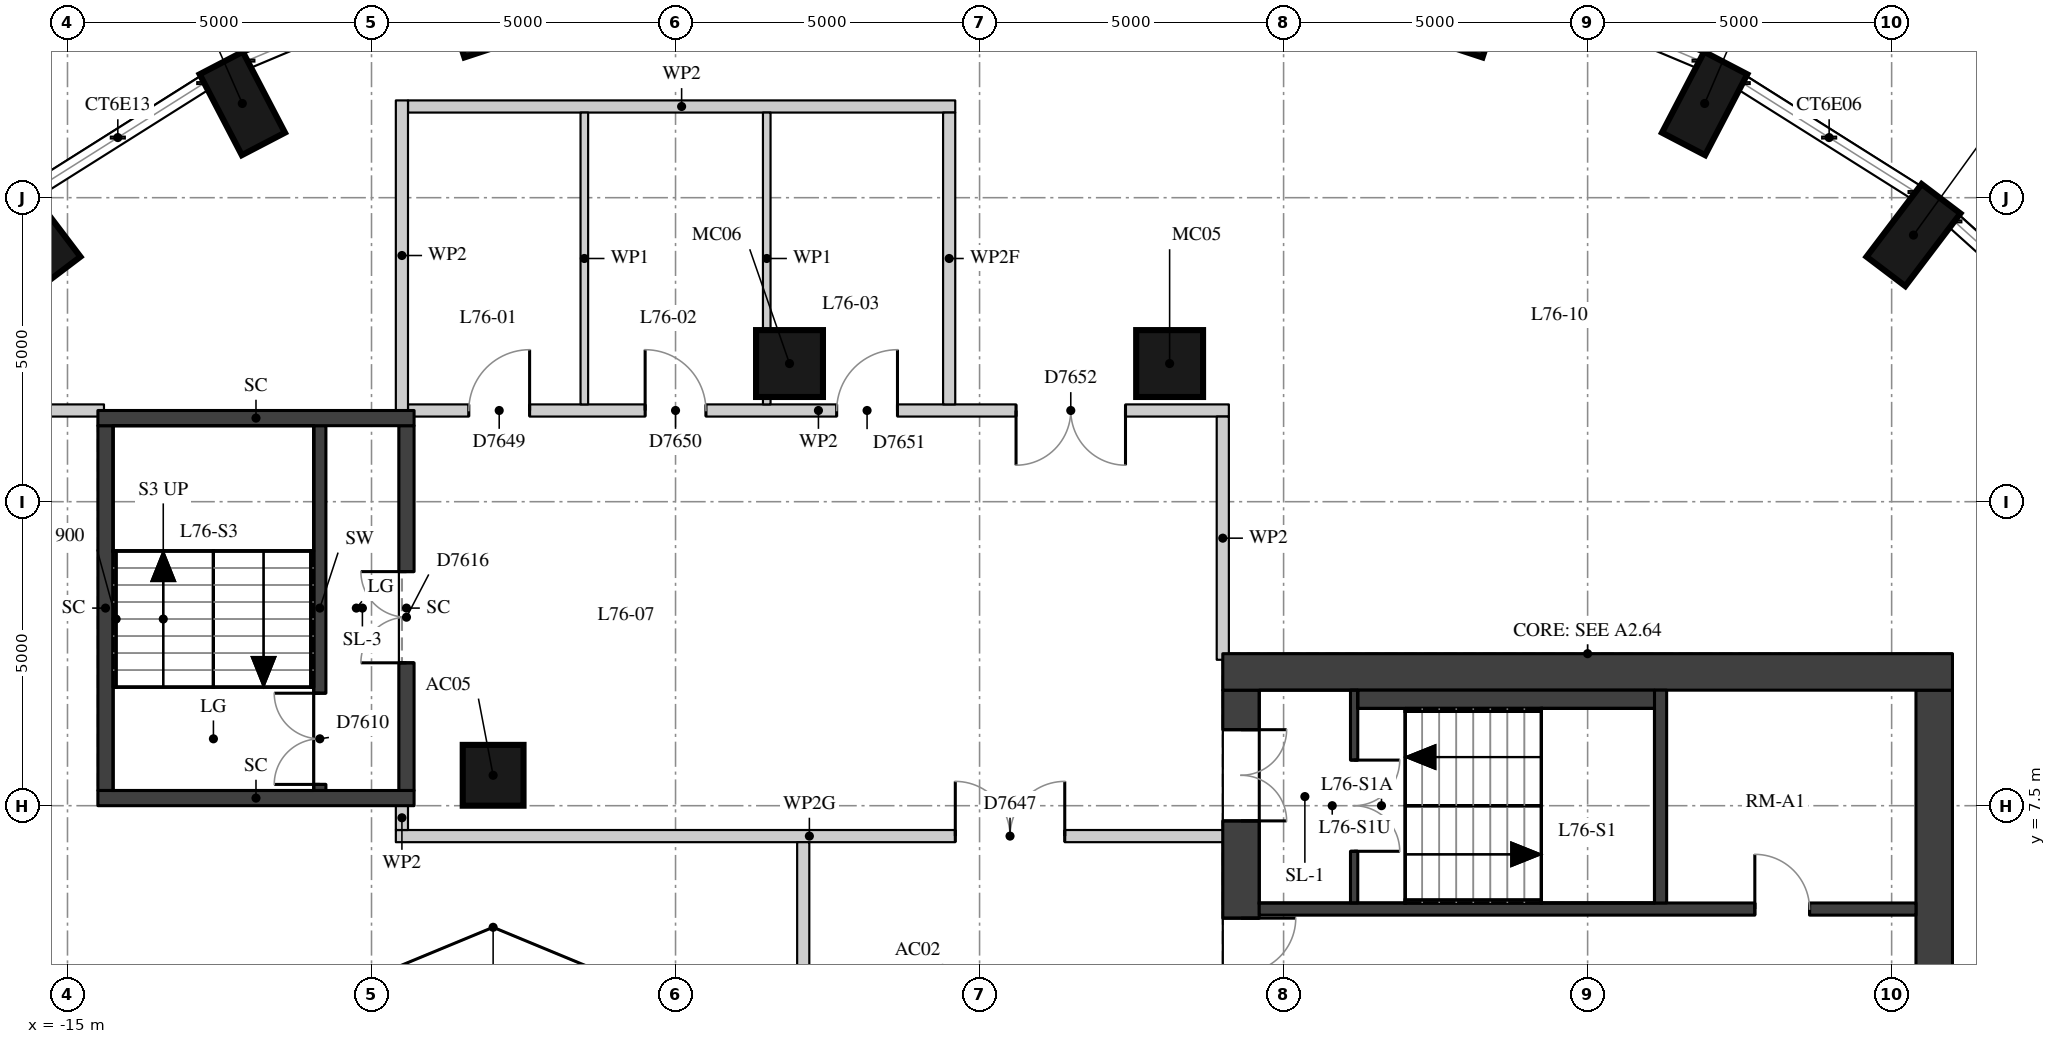
"""IFC4 building model, lengths in metres.
Left out: names, types, materials, properties, quantities, classifications, styles, units other than length and angle.
Written with IfcOpenShell. Run it as: python <this file> out.ifc"""

import sys

from ifc_helpers import new_model, si_unit, direction, frame, frame_2d, origin, origin_2d, place, context, subcontext, project, spatial, rectangle, extrude, element, fill, save


model = new_model("IFC4")
c1 = context("Model", 3, precision=1e-05, world=origin(), true_north=direction((0.0, 1.0)))
c2 = subcontext(c1, "Body", "Model", "MODEL_VIEW")
j1 = project(units=[si_unit("LENGTHUNIT", "METRE"), si_unit("PLANEANGLEUNIT", "RADIAN")], contexts=[c1])
p1 = place(None, origin())
s1 = spatial("IfcSite", under=j1, at=p1, CompositionType="ELEMENT")
p2 = place(p1, origin())
s2 = spatial("IfcBuilding", under=s1, at=p2, CompositionType="ELEMENT")
p3 = place(p2, frame((0.0, 0.0, 269.2)))
s3 = spatial("IfcBuildingStorey", under=s2, at=p3, CompositionType="ELEMENT", Elevation=269.2)
for number, where, z_axis, x_axis in (
    (1, (15.359, 16.885, 0.0), (0.0, 0.0, 1.0), (0.604, 0.797, 0.0)),
    (2, (11.925, 19.05, 0.0), (0.0, 0.0, 1.0), (0.462, 0.887, 0.0)),
    (3, (8.125, 20.644, 0.0), (0.0, 0.0, 1.0), (0.312, 0.95, 0.0)),
    (4, (-8.326, 20.644, 0.0), (0.0, 0.0, 1.0), (-0.312, 0.95, 0.0)),
    (5, (-12.125, 19.05, 0.0), (0.0, 0.0, 1.0), (-0.462, 0.887, 0.0)),
    (6, (-15.559, 16.885, 0.0), (0.0, 0.0, 1.0), (-0.604, 0.797, 0.0)),
):
    element("IfcColumn", number, at=place(p3, frame(where, z_axis=z_axis, x_axis=x_axis)), inside=s3, PredefinedType="COLUMN", context=c2, shape_type="SweptSolid", body=[
        extrude(rectangle(XDim=1.5, YDim=0.8, at=origin_2d()), origin(), (0.0, 0.0, 1.0), 6.0),
    ])
p4 = place(p3, frame((-8.0, 8.0, 0.0), z_axis=(0.0, 0.0, 1.0), x_axis=(1.0, 0.0, 0.0)))
e7 = element("IfcColumn", 7, at=p4, inside=s3, PredefinedType="COLUMN", context=c2, shape_type="SweptSolid", body=[
    extrude(rectangle(XDim=1.0, YDim=1.0, at=origin_2d()), origin(), (0.0, 0.0, 1.0), 6.0),
])
for number, where, z_axis, x_axis in (
    (8, (3.126, 14.772, 0.0), (0.0, 0.0, 1.0), (1.0, 0.0, 0.0)),
    (9, (-3.126, 14.772, 0.0), (0.0, 0.0, 1.0), (1.0, 0.0, 0.0)),
):
    element("IfcColumn", number, at=place(p3, frame(where, z_axis=z_axis, x_axis=x_axis)), inside=s3, PredefinedType="COLUMN", context=c2, shape_type="SweptSolid", body=[
        extrude(rectangle(XDim=1.1, YDim=1.1, at=origin_2d()), origin(), (0.0, 0.0, 1.0), 6.0),
    ])
p5 = place(p3, frame((4.3, -9.4, 0.0), z_axis=(0.0, 0.0, 1.0), x_axis=(0.0, 1.0, 0.0)))
e10 = element("IfcWall", 10, at=p5, inside=s3, PredefinedType="SHEAR", context=c2, shape_type="SweptSolid", body=[
    extrude(rectangle(XDim=18.8, YDim=0.6, at=frame_2d((9.4, 0.0))), origin(), (0.0, 0.0, 1.0), 5.7),
])
p6 = place(p5, frame((0.65, 0.0, 0.0)))
e11 = element("IfcOpeningElement", 11, at=p6, cuts=e10, PredefinedType="OPENING", context=c2, shape_type="SweptSolid", body=[
    extrude(rectangle(XDim=1.5, YDim=2.1, at=frame_2d((0.75, 1.05))), frame((0.0, 0.31, 0.0), z_axis=(0.0, -1.0, 0.0), x_axis=(1.0, 0.0, 0.0)), (0.0, 0.0, 1.0), 0.62),
])
p7 = place(p5, frame((3.75, 0.0, 0.0)))
e12 = element("IfcOpeningElement", 12, at=p7, cuts=e10, PredefinedType="OPENING", context=c2, shape_type="SweptSolid", body=[
    extrude(rectangle(XDim=1.8, YDim=2.1, at=frame_2d((0.9, 1.05))), frame((0.0, 0.31, 0.0), z_axis=(0.0, -1.0, 0.0), x_axis=(1.0, 0.0, 0.0)), (0.0, 0.0, 1.0), 0.62),
])
p8 = place(p5, frame((6.25, 0.0, 0.0)))
e13 = element("IfcOpeningElement", 13, at=p8, cuts=e10, PredefinedType="OPENING", context=c2, shape_type="SweptSolid", body=[
    extrude(rectangle(XDim=1.1, YDim=2.1, at=frame_2d((0.55, 1.05))), frame((0.0, 0.31, 0.0), z_axis=(0.0, -1.0, 0.0), x_axis=(1.0, 0.0, 0.0)), (0.0, 0.0, 1.0), 0.62),
])
p9 = place(p5, frame((8.9, 0.0, 0.0)))
e14 = element("IfcOpeningElement", 14, at=p9, cuts=e10, PredefinedType="OPENING", context=c2, shape_type="SweptSolid", body=[
    extrude(rectangle(XDim=1.0, YDim=2.1, at=frame_2d((0.5, 1.05))), frame((0.0, 0.31, 0.0), z_axis=(0.0, -1.0, 0.0), x_axis=(1.0, 0.0, 0.0)), (0.0, 0.0, 1.0), 0.62),
])
p10 = place(p5, frame((11.45, 0.0, 0.0)))
e15 = element("IfcOpeningElement", 15, at=p10, cuts=e10, PredefinedType="OPENING", context=c2, shape_type="SweptSolid", body=[
    extrude(rectangle(XDim=1.1, YDim=2.1, at=frame_2d((0.55, 1.05))), frame((0.0, 0.31, 0.0), z_axis=(0.0, -1.0, 0.0), x_axis=(1.0, 0.0, 0.0)), (0.0, 0.0, 1.0), 0.62),
])
p11 = place(p5, frame((13.25, 0.0, 0.0)))
e16 = element("IfcOpeningElement", 16, at=p11, cuts=e10, PredefinedType="OPENING", context=c2, shape_type="SweptSolid", body=[
    extrude(rectangle(XDim=1.8, YDim=2.1, at=frame_2d((0.9, 1.05))), frame((0.0, 0.31, 0.0), z_axis=(0.0, -1.0, 0.0), x_axis=(1.0, 0.0, 0.0)), (0.0, 0.0, 1.0), 0.62),
])
p12 = place(p5, frame((16.65, 0.0, 0.0)))
e17 = element("IfcOpeningElement", 17, at=p12, cuts=e10, PredefinedType="OPENING", context=c2, shape_type="SweptSolid", body=[
    extrude(rectangle(XDim=1.5, YDim=2.1, at=frame_2d((0.75, 1.05))), frame((0.0, 0.31, 0.0), z_axis=(0.0, -1.0, 0.0), x_axis=(1.0, 0.0, 0.0)), (0.0, 0.0, 1.0), 0.62),
])
p13 = place(p3, frame((15.7, -9.4, 0.0), z_axis=(0.0, 0.0, 1.0), x_axis=(0.0, 1.0, 0.0)))
e18 = element("IfcWall", 18, at=p13, inside=s3, PredefinedType="SHEAR", context=c2, shape_type="SweptSolid", body=[
    extrude(rectangle(XDim=18.8, YDim=0.6, at=frame_2d((9.4, 0.0))), origin(), (0.0, 0.0, 1.0), 5.7),
])
p14 = place(p3, frame((4.0, 9.7, 0.0), z_axis=(0.0, 0.0, 1.0), x_axis=(1.0, 0.0, 0.0)))
e19 = element("IfcWall", 19, at=p14, inside=s3, PredefinedType="SHEAR", context=c2, shape_type="SweptSolid", body=[
    extrude(rectangle(XDim=12.0, YDim=0.6, at=frame_2d((6.0, 0.0))), origin(), (0.0, 0.0, 1.0), 5.7),
])
p15 = place(p3, frame((4.6, 5.8, 0.0), z_axis=(0.0, 0.0, 1.0), x_axis=(1.0, 0.0, 0.0)))
e20 = element("IfcWall", 20, at=p15, inside=s3, PredefinedType="SHEAR", context=c2, shape_type="SweptSolid", body=[
    extrude(rectangle(XDim=10.8, YDim=0.2, at=frame_2d((5.4, 0.0))), origin(), (0.0, 0.0, 1.0), 5.7),
])
p16 = place(p15, frame((8.15, 0.0, 0.0)))
e21 = element("IfcOpeningElement", 21, at=p16, cuts=e20, PredefinedType="OPENING", context=c2, shape_type="SweptSolid", body=[
    extrude(rectangle(XDim=0.9, YDim=2.1, at=frame_2d((0.45, 1.05))), frame((0.0, 0.11, 0.0), z_axis=(0.0, -1.0, 0.0), x_axis=(1.0, 0.0, 0.0)), (0.0, 0.0, 1.0), 0.22),
])
p17 = place(p3, frame((11.2, 5.9, 0.0), z_axis=(0.0, 0.0, 1.0), x_axis=(0.0, 1.0, 0.0)))
e22 = element("IfcWall", 22, at=p17, inside=s3, PredefinedType="SHEAR", context=c2, shape_type="SweptSolid", body=[
    extrude(rectangle(XDim=3.5, YDim=0.2, at=frame_2d((1.75, 0.0))), origin(), (0.0, 0.0, 1.0), 5.7),
])
p18 = place(p3, frame((6.16, 5.9, 0.0), z_axis=(0.0, 0.0, 1.0), x_axis=(0.0, 1.0, 0.0)))
e23 = element("IfcWall", 23, at=p18, inside=s3, PredefinedType="SHEAR", context=c2, shape_type="SweptSolid", body=[
    extrude(rectangle(XDim=3.5, YDim=0.12, at=frame_2d((1.75, 0.0))), origin(), (0.0, 0.0, 1.0), 2.79),
])
p19 = place(p18, frame((0.85, 0.0, 0.0)))
e24 = element("IfcOpeningElement", 24, at=p19, cuts=e23, PredefinedType="OPENING", context=c2, shape_type="SweptSolid", body=[
    extrude(rectangle(XDim=1.5, YDim=2.1, at=frame_2d((0.75, 1.05))), frame((0.0, 0.07, 0.0), z_axis=(0.0, -1.0, 0.0), x_axis=(1.0, 0.0, 0.0)), (0.0, 0.0, 1.0), 0.14),
])
p20 = place(p3, frame((-10.85, 7.75, 0.0), z_axis=(0.0, 0.0, 1.0), x_axis=(0.0, 1.0, 0.0)))
e25 = element("IfcWall", 25, at=p20, inside=s3, PredefinedType="SHEAR", context=c2, shape_type="SweptSolid", body=[
    extrude(rectangle(XDim=6.0, YDim=0.2, at=frame_2d((3.0, 0.0))), origin(), (0.0, 0.0, 1.0), 5.7),
])
p21 = place(p20, frame((0.1, 0.0, 0.0)))
e26 = element("IfcOpeningElement", 26, at=p21, cuts=e25, PredefinedType="OPENING", context=c2, shape_type="SweptSolid", body=[
    extrude(rectangle(XDim=1.5, YDim=2.1, at=frame_2d((0.75, 1.05))), frame((0.0, 0.11, 0.0), z_axis=(0.0, -1.0, 0.0), x_axis=(1.0, 0.0, 0.0)), (0.0, 0.0, 1.0), 0.22),
])
p22 = place(p3, frame((6.22, 9.25, 0.0), z_axis=(0.0, 0.0, 1.0), x_axis=(1.0, 0.0, 0.0)))
e27 = element("IfcWall", 27, at=p22, inside=s3, PredefinedType="PARTITIONING", context=c2, shape_type="SweptSolid", body=[
    extrude(rectangle(XDim=4.88, YDim=0.3, at=frame_2d((2.44, 0.0))), origin(), (0.0, 0.0, 1.0), 5.7),
])
p23 = place(p3, frame((-14.375, 7.75, -0.41), z_axis=(0.0, 0.0, 1.0), x_axis=(0.0, 1.0, 0.0)))
e28 = element("IfcWall", 28, at=p23, inside=s3, PredefinedType="SHEAR", context=c2, shape_type="SweptSolid", body=[
    extrude(rectangle(XDim=6.0, YDim=0.25, at=frame_2d((3.0, 0.0))), origin(), (0.0, 0.0, 1.0), 6.11),
])
p24 = place(p3, frame((-9.425, 7.75, -0.41), z_axis=(0.0, 0.0, 1.0), x_axis=(0.0, 1.0, 0.0)))
e29 = element("IfcWall", 29, at=p24, inside=s3, PredefinedType="SHEAR", context=c2, shape_type="SweptSolid", body=[
    extrude(rectangle(XDim=6.0, YDim=0.25, at=frame_2d((3.0, 0.0))), origin(), (0.0, 0.0, 1.0), 6.11),
])
p25 = place(p24, frame((2.1, 0.0, 0.41)))
e30 = element("IfcOpeningElement", 30, at=p25, cuts=e29, PredefinedType="OPENING", context=c2, shape_type="SweptSolid", body=[
    extrude(rectangle(XDim=1.5, YDim=2.1, at=frame_2d((0.75, 1.05))), frame((0.0, 0.135, 0.0), z_axis=(0.0, -1.0, 0.0), x_axis=(1.0, 0.0, 0.0)), (0.0, 0.0, 1.0), 0.27),
])
for number, where, z_axis, x_axis in (
    (31, (-14.5, 13.875, -0.41), (0.0, 0.0, 1.0), (1.0, 0.0, 0.0)),
    (32, (-14.5, 7.625, -0.41), (0.0, 0.0, 1.0), (1.0, 0.0, 0.0)),
):
    element("IfcWall", number, at=place(p3, frame(where, z_axis=z_axis, x_axis=x_axis)), inside=s3, PredefinedType="SHEAR", context=c2, shape_type="SweptSolid", body=[
        extrude(rectangle(XDim=5.2, YDim=0.25, at=frame_2d((2.6, 0.0))), origin(), (0.0, 0.0, 1.0), 6.11),
    ])
p26 = place(p3, frame((-9.6, 7.0, 0.0), z_axis=(0.0, 0.0, 1.0), x_axis=(1.0, 0.0, 0.0)))
e33 = element("IfcWall", 33, at=p26, inside=s3, PredefinedType="PARTITIONING", context=c2, shape_type="SweptSolid", body=[
    extrude(rectangle(XDim=13.602, YDim=0.2, at=frame_2d((6.801, 0.0))), origin(), (0.0, 0.0, 1.0), 5.15),
])
p27 = place(p26, frame((9.201, 0.0, 0.0)))
e34 = element("IfcOpeningElement", 34, at=p27, cuts=e33, PredefinedType="OPENING", context=c2, shape_type="SweptSolid", body=[
    extrude(rectangle(XDim=1.8, YDim=2.1, at=frame_2d((0.9, 1.05))), frame((0.0, 0.11, 0.0), z_axis=(0.0, -1.0, 0.0), x_axis=(1.0, 0.0, 0.0)), (0.0, 0.0, 1.0), 0.22),
])
p28 = place(p3, frame((-19.15, 14.0, 0.0), z_axis=(0.0, 0.0, 1.0), x_axis=(1.0, 0.0, 0.0)))
e35 = element("IfcWall", 35, at=p28, inside=s3, PredefinedType="PARTITIONING", context=c2, shape_type="SweptSolid", body=[
    extrude(rectangle(XDim=4.75, YDim=0.2, at=frame_2d((2.375, 0.0))), origin(), (0.0, 0.0, 1.0), 5.7),
])
p29 = place(p28, frame((1.725, 0.0, 0.0)))
e36 = element("IfcOpeningElement", 36, at=p29, cuts=e35, PredefinedType="OPENING", context=c2, shape_type="SweptSolid", body=[
    extrude(rectangle(XDim=1.8, YDim=2.1, at=frame_2d((0.9, 1.05))), frame((0.0, 0.11, 0.0), z_axis=(0.0, -1.0, 0.0), x_axis=(1.0, 0.0, 0.0)), (0.0, 0.0, 1.0), 0.22),
])
p30 = place(p3, frame((-9.4, 14.0, 0.0), z_axis=(0.0, 0.0, 1.0), x_axis=(1.0, 0.0, 0.0)))
e37 = element("IfcWall", 37, at=p30, inside=s3, PredefinedType="PARTITIONING", context=c2, shape_type="SweptSolid", body=[
    extrude(rectangle(XDim=13.5, YDim=0.2, at=frame_2d((6.75, 0.0))), origin(), (0.0, 0.0, 1.0), 5.7),
])
p31 = place(p30, frame((10.0, 0.0, 0.0)))
e38 = element("IfcOpeningElement", 38, at=p31, cuts=e37, PredefinedType="OPENING", context=c2, shape_type="SweptSolid", body=[
    extrude(rectangle(XDim=1.8, YDim=2.1, at=frame_2d((0.9, 1.05))), frame((0.0, 0.11, 0.0), z_axis=(0.0, -1.0, 0.0), x_axis=(1.0, 0.0, 0.0)), (0.0, 0.0, 1.0), 0.22),
])
p32 = place(p30, frame((1.0, 0.0, 0.0)))
e39 = element("IfcOpeningElement", 39, at=p32, cuts=e37, PredefinedType="OPENING", context=c2, shape_type="SweptSolid", body=[
    extrude(rectangle(XDim=1.0, YDim=2.1, at=frame_2d((0.5, 1.05))), frame((0.0, 0.11, 0.0), z_axis=(0.0, -1.0, 0.0), x_axis=(1.0, 0.0, 0.0)), (0.0, 0.0, 1.0), 0.22),
])
p33 = place(p30, frame((3.9, 0.0, 0.0)))
e40 = element("IfcOpeningElement", 40, at=p33, cuts=e37, PredefinedType="OPENING", context=c2, shape_type="SweptSolid", body=[
    extrude(rectangle(XDim=1.0, YDim=2.1, at=frame_2d((0.5, 1.05))), frame((0.0, 0.11, 0.0), z_axis=(0.0, -1.0, 0.0), x_axis=(1.0, 0.0, 0.0)), (0.0, 0.0, 1.0), 0.22),
])
p34 = place(p30, frame((7.05, 0.0, 0.0)))
e41 = element("IfcOpeningElement", 41, at=p34, cuts=e37, PredefinedType="OPENING", context=c2, shape_type="SweptSolid", body=[
    extrude(rectangle(XDim=1.0, YDim=2.1, at=frame_2d((0.5, 1.05))), frame((0.0, 0.11, 0.0), z_axis=(0.0, -1.0, 0.0), x_axis=(1.0, 0.0, 0.0)), (0.0, 0.0, 1.0), 0.22),
])
p35 = place(p3, frame((-9.4, 19.0, 0.0), z_axis=(0.0, 0.0, 1.0), x_axis=(1.0, 0.0, 0.0)))
e42 = element("IfcWall", 42, at=p35, inside=s3, PredefinedType="PARTITIONING", context=c2, shape_type="SweptSolid", body=[
    extrude(rectangle(XDim=9.0, YDim=0.2, at=frame_2d((4.5, 0.0))), origin(), (0.0, 0.0, 1.0), 5.7),
])
p36 = place(p3, frame((-9.5, 7.1, 0.0), z_axis=(0.0, 0.0, 1.0), x_axis=(0.0, 1.0, 0.0)))
e43 = element("IfcWall", 43, at=p36, inside=s3, PredefinedType="PARTITIONING", context=c2, shape_type="SweptSolid", body=[
    extrude(rectangle(XDim=0.402, YDim=0.2, at=frame_2d((0.201, 0.0))), origin(), (0.0, 0.0, 1.0), 5.7),
])
p37 = place(p3, frame((-9.5, 13.998, 0.0), z_axis=(0.0, 0.0, 1.0), x_axis=(0.0, 1.0, 0.0)))
e44 = element("IfcWall", 44, at=p37, inside=s3, PredefinedType="PARTITIONING", context=c2, shape_type="SweptSolid", body=[
    extrude(rectangle(XDim=5.102, YDim=0.2, at=frame_2d((2.551, 0.0))), origin(), (0.0, 0.0, 1.0), 5.7),
])
for number, where, z_axis, x_axis in (
    (45, (-6.5, 14.1, 0.0), (0.0, 0.0, 1.0), (0.0, 1.0, 0.0)),
    (46, (-3.5, 14.1, 0.0), (0.0, 0.0, 1.0), (0.0, 1.0, 0.0)),
):
    element("IfcWall", number, at=place(p3, frame(where, z_axis=z_axis, x_axis=x_axis)), inside=s3, PredefinedType="PARTITIONING", context=c2, shape_type="SweptSolid", body=[
        extrude(rectangle(XDim=4.8, YDim=0.125, at=frame_2d((2.4, 0.0))), origin(), (0.0, 0.0, 1.0), 5.7),
    ])
p38 = place(p3, frame((-2.9, 0.866, 0.0), z_axis=(0.0, 0.0, 1.0), x_axis=(0.0, 1.0, 0.0)))
e47 = element("IfcWall", 47, at=p38, inside=s3, PredefinedType="PARTITIONING", context=c2, shape_type="SweptSolid", body=[
    extrude(rectangle(XDim=6.034, YDim=0.2, at=frame_2d((3.017, 0.0))), origin(), (0.0, 0.0, 1.0), 5.7),
])
p39 = place(p3, frame((-0.5, 14.1, 0.0), z_axis=(0.0, 0.0, 1.0), x_axis=(0.0, 1.0, 0.0)))
e48 = element("IfcWall", 48, at=p39, inside=s3, PredefinedType="PARTITIONING", context=c2, shape_type="SweptSolid", body=[
    extrude(rectangle(XDim=4.8, YDim=0.2, at=frame_2d((2.4, 0.0))), origin(), (0.0, 0.0, 1.0), 5.25),
])
p40 = place(p3, frame((4.0, 9.9, 0.0), z_axis=(0.0, 0.0, 1.0), x_axis=(0.0, 1.0, 0.0)))
e49 = element("IfcWall", 49, at=p40, inside=s3, PredefinedType="PARTITIONING", context=c2, shape_type="SweptSolid", body=[
    extrude(rectangle(XDim=4.0, YDim=0.2, at=frame_2d((2.0, 0.0))), origin(), (0.0, 0.0, 1.0), 5.7),
])
p41 = place(p11, origin())
e50 = element("IfcDoor", 50, at=p41, inside=s3, OperationType="DOUBLE_DOOR_SINGLE_SWING", PredefinedType="DOOR", context=c2, shape_type="SweptSolid", body=[
    extrude(rectangle(XDim=1.8, YDim=2.1, at=frame_2d((0.9, 1.05))), frame((0.0, 0.025, 0.0), z_axis=(0.0, -1.0, 0.0), x_axis=(1.0, 0.0, 0.0)), (0.0, 0.0, 1.0), 0.05),
])
fill(e16, e50)
p42 = place(p12, origin())
e51 = element("IfcDoor", 51, at=p42, inside=s3, OperationType="DOUBLE_DOOR_SINGLE_SWING", PredefinedType="DOOR", context=c2, shape_type="SweptSolid", body=[
    extrude(rectangle(XDim=1.5, YDim=2.1, at=frame_2d((0.75, 1.05))), frame((0.0, 0.025, 0.0), z_axis=(0.0, -1.0, 0.0), x_axis=(1.0, 0.0, 0.0)), (0.0, 0.0, 1.0), 0.05),
])
fill(e17, e51)
p43 = place(p19, origin())
e52 = element("IfcDoor", 52, at=p43, inside=s3, OperationType="DOUBLE_DOOR_SINGLE_SWING", PredefinedType="DOOR", context=c2, shape_type="SweptSolid", body=[
    extrude(rectangle(XDim=1.5, YDim=2.1, at=frame_2d((0.75, 1.05))), frame((0.0, 0.025, 0.0), z_axis=(0.0, -1.0, 0.0), x_axis=(1.0, 0.0, 0.0)), (0.0, 0.0, 1.0), 0.05),
])
fill(e24, e52)
p44 = place(p21, origin())
e53 = element("IfcDoor", 53, at=p44, inside=s3, OperationType="DOUBLE_DOOR_SINGLE_SWING", PredefinedType="DOOR", context=c2, shape_type="SweptSolid", body=[
    extrude(rectangle(XDim=1.5, YDim=2.1, at=frame_2d((0.75, 1.05))), frame((0.0, 0.025, 0.0), z_axis=(0.0, -1.0, 0.0), x_axis=(1.0, 0.0, 0.0)), (0.0, 0.0, 1.0), 0.05),
])
fill(e26, e53)
p45 = place(p16, origin())
e54 = element("IfcDoor", 54, at=p45, inside=s3, OperationType="SINGLE_SWING_LEFT", PredefinedType="DOOR", context=c2, shape_type="SweptSolid", body=[
    extrude(rectangle(XDim=0.9, YDim=2.1, at=frame_2d((0.45, 1.05))), frame((0.0, 0.025, 0.0), z_axis=(0.0, -1.0, 0.0), x_axis=(1.0, 0.0, 0.0)), (0.0, 0.0, 1.0), 0.05),
])
fill(e21, e54)
p46 = place(p25, origin())
e55 = element("IfcDoor", 55, at=p46, inside=s3, OperationType="DOUBLE_DOOR_SINGLE_SWING", PredefinedType="DOOR", context=c2, shape_type="SweptSolid", body=[
    extrude(rectangle(XDim=1.5, YDim=2.1, at=frame_2d((0.75, 1.05))), frame((0.0, 0.025, 0.0), z_axis=(0.0, -1.0, 0.0), x_axis=(1.0, 0.0, 0.0)), (0.0, 0.0, 1.0), 0.05),
])
fill(e30, e55)
p47 = place(p31, origin())
e56 = element("IfcDoor", 56, at=p47, inside=s3, OperationType="DOUBLE_DOOR_SINGLE_SWING", PredefinedType="DOOR", context=c2, shape_type="SweptSolid", body=[
    extrude(rectangle(XDim=1.8, YDim=2.1, at=frame_2d((0.9, 1.05))), frame((0.0, 0.025, 0.0), z_axis=(0.0, -1.0, 0.0), x_axis=(1.0, 0.0, 0.0)), (0.0, 0.0, 1.0), 0.05),
])
fill(e38, e56)
p48 = place(p27, origin())
e57 = element("IfcDoor", 57, at=p48, inside=s3, OperationType="DOUBLE_DOOR_SINGLE_SWING", PredefinedType="DOOR", context=c2, shape_type="SweptSolid", body=[
    extrude(rectangle(XDim=1.8, YDim=2.1, at=frame_2d((0.9, 1.05))), frame((0.0, 0.025, 0.0), z_axis=(0.0, -1.0, 0.0), x_axis=(1.0, 0.0, 0.0)), (0.0, 0.0, 1.0), 0.05),
])
fill(e34, e57)
p49 = place(p32, origin())
e58 = element("IfcDoor", 58, at=p49, inside=s3, OperationType="SINGLE_SWING_RIGHT", PredefinedType="DOOR", context=c2, shape_type="SweptSolid", body=[
    extrude(rectangle(XDim=1.0, YDim=2.1, at=frame_2d((0.5, 1.05))), frame((0.0, 0.025, 0.0), z_axis=(0.0, -1.0, 0.0), x_axis=(1.0, 0.0, 0.0)), (0.0, 0.0, 1.0), 0.05),
])
fill(e39, e58)
p50 = place(p33, origin())
e59 = element("IfcDoor", 59, at=p50, inside=s3, OperationType="SINGLE_SWING_LEFT", PredefinedType="DOOR", context=c2, shape_type="SweptSolid", body=[
    extrude(rectangle(XDim=1.0, YDim=2.1, at=frame_2d((0.5, 1.05))), frame((0.0, 0.025, 0.0), z_axis=(0.0, -1.0, 0.0), x_axis=(1.0, 0.0, 0.0)), (0.0, 0.0, 1.0), 0.05),
])
fill(e40, e59)
p51 = place(p34, origin())
e60 = element("IfcDoor", 60, at=p51, inside=s3, OperationType="SINGLE_SWING_RIGHT", PredefinedType="DOOR", context=c2, shape_type="SweptSolid", body=[
    extrude(rectangle(XDim=1.0, YDim=2.1, at=frame_2d((0.5, 1.05))), frame((0.0, 0.025, 0.0), z_axis=(0.0, -1.0, 0.0), x_axis=(1.0, 0.0, 0.0)), (0.0, 0.0, 1.0), 0.05),
])
fill(e41, e60)
save(model, sys.argv[1])
